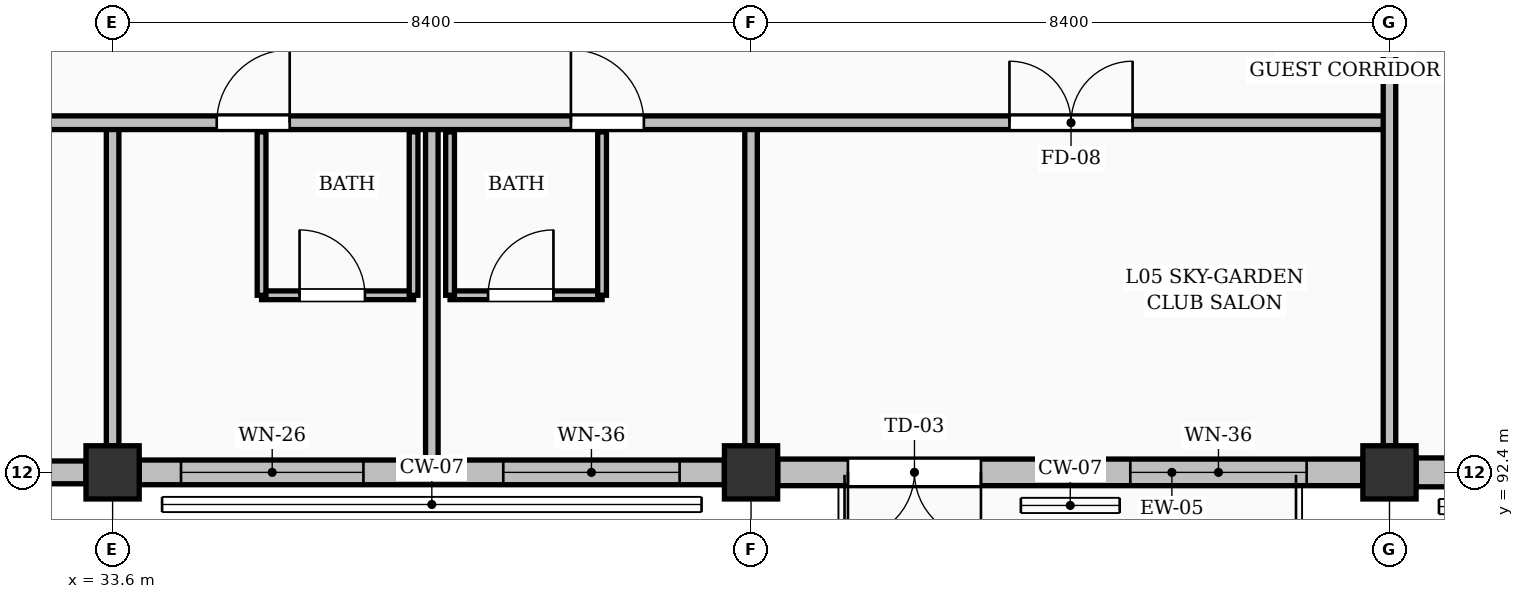
"""IFC4 building model, lengths in metres.
Left out: names, types, materials, properties, quantities, classifications, styles, units other than length and angle.
Written with IfcOpenShell. Run it as: python <this file> out.ifc"""

import sys

from ifc_helpers import new_model, si_unit, direction, frame, frame_2d, origin, origin_2d, place, context, subcontext, project, spatial, rectangle, extrude, element, fill, save


model = new_model("IFC4")
c1 = context("Model", 3, precision=1e-05, world=origin(), true_north=direction((0.0, 1.0)))
c2 = subcontext(c1, "Body", "Model", "MODEL_VIEW")
j1 = project(units=[si_unit("LENGTHUNIT", "METRE"), si_unit("PLANEANGLEUNIT", "RADIAN")], contexts=[c1])
p1 = place(None, origin())
s1 = spatial("IfcSite", under=j1, at=p1, CompositionType="ELEMENT")
p2 = place(p1, origin())
s2 = spatial("IfcBuilding", under=s1, at=p2, CompositionType="ELEMENT")
p3 = place(p2, frame((0.0, 0.0, 18.48)))
s3 = spatial("IfcBuildingStorey", under=s2, at=p3, CompositionType="ELEMENT", Elevation=18.48)
for number, where, z_axis, x_axis in (
    (1, (33.6, 92.4, 0.0), (0.0, 0.0, 1.0), (1.0, 0.0, 0.0)),
    (2, (42.0, 92.4, 0.0), (0.0, 0.0, 1.0), (1.0, 0.0, 0.0)),
    (3, (50.4, 92.4, 0.0), (0.0, 0.0, 1.0), (1.0, 0.0, 0.0)),
):
    element("IfcColumn", number, at=place(p3, frame(where, z_axis=z_axis, x_axis=x_axis)), inside=s3, PredefinedType="COLUMN", context=c2, shape_type="SweptSolid", body=[
        extrude(rectangle(XDim=0.7, YDim=0.7, at=origin_2d()), origin(), (0.0, 0.0, 1.0), 3.36),
    ])
p4 = place(p3, frame((25.551, 92.4, 0.0), z_axis=(0.0, 0.0, 1.0), x_axis=(1.0, 0.0, 0.0)))
e4 = element("IfcWall", 4, at=p4, inside=s3, PredefinedType="SOLIDWALL", context=c2, shape_type="SweptSolid", body=[
    extrude(rectangle(XDim=7.698, YDim=0.3, at=frame_2d((3.849, 0.0))), origin(), (0.0, 0.0, 1.0), 2.494),
])
p5 = place(p4, frame((0.974, 0.0, 0.0)))
e5 = element("IfcOpeningElement", 5, at=p5, cuts=e4, PredefinedType="OPENING", context=c2, shape_type="SweptSolid", body=[
    extrude(rectangle(XDim=1.65, YDim=2.08, at=frame_2d((0.825, 1.04))), frame((0.0, 0.16, 0.0), z_axis=(0.0, -1.0, 0.0), x_axis=(1.0, 0.0, 0.0)), (0.0, 0.0, 1.0), 0.32),
])
p6 = place(p4, frame((4.649, 0.0, 0.25)))
e6 = element("IfcOpeningElement", 6, at=p6, cuts=e4, PredefinedType="OPENING", context=c2, shape_type="SweptSolid", body=[
    extrude(rectangle(XDim=2.3, YDim=1.75, at=frame_2d((1.15, 0.875))), frame((0.0, 0.16, 0.0), z_axis=(0.0, -1.0, 0.0), x_axis=(1.0, 0.0, 0.0)), (0.0, 0.0, 1.0), 0.32),
])
p7 = place(p3, frame((33.951, 92.4, 0.0), z_axis=(0.0, 0.0, 1.0), x_axis=(1.0, 0.0, 0.0)))
e7 = element("IfcWall", 7, at=p7, inside=s3, PredefinedType="SOLIDWALL", context=c2, shape_type="SweptSolid", body=[
    extrude(rectangle(XDim=7.698, YDim=0.325, at=frame_2d((3.849, 0.0))), origin(), (0.0, 0.0, 1.0), 2.494),
])
p8 = place(p7, frame((0.549, 0.0, 0.25)))
e8 = element("IfcOpeningElement", 8, at=p8, cuts=e7, PredefinedType="OPENING", context=c2, shape_type="SweptSolid", body=[
    extrude(rectangle(XDim=2.4, YDim=1.75, at=frame_2d((1.2, 0.875))), frame((0.0, 0.172, 0.0), z_axis=(0.0, -1.0, 0.0), x_axis=(1.0, 0.0, 0.0)), (0.0, 0.0, 1.0), 0.345),
])
p9 = place(p7, frame((4.789, 0.0, 0.25)))
e9 = element("IfcOpeningElement", 9, at=p9, cuts=e7, PredefinedType="OPENING", context=c2, shape_type="SweptSolid", body=[
    extrude(rectangle(XDim=2.32, YDim=1.9, at=frame_2d((1.16, 0.95))), frame((0.0, 0.172, 0.0), z_axis=(0.0, -1.0, 0.0), x_axis=(1.0, 0.0, 0.0)), (0.0, 0.0, 1.0), 0.345),
])
p10 = place(p3, frame((42.351, 92.4, 0.0), z_axis=(0.0, 0.0, 1.0), x_axis=(1.0, 0.0, 0.0)))
e10 = element("IfcWall", 10, at=p10, inside=s3, PredefinedType="SOLIDWALL", context=c2, shape_type="SweptSolid", body=[
    extrude(rectangle(XDim=7.698, YDim=0.35, at=frame_2d((3.849, 0.0))), origin(), (0.0, 0.0, 1.0), 2.494),
])
p11 = place(p10, frame((0.924, 0.0, 0.0)))
e11 = element("IfcOpeningElement", 11, at=p11, cuts=e10, PredefinedType="OPENING", context=c2, shape_type="SweptSolid", body=[
    extrude(rectangle(XDim=1.75, YDim=2.08, at=frame_2d((0.875, 1.04))), frame((0.0, 0.185, 0.0), z_axis=(0.0, -1.0, 0.0), x_axis=(1.0, 0.0, 0.0)), (0.0, 0.0, 1.0), 0.37),
])
p12 = place(p10, frame((4.639, 0.0, 0.25)))
e12 = element("IfcOpeningElement", 12, at=p12, cuts=e10, PredefinedType="OPENING", context=c2, shape_type="SweptSolid", body=[
    extrude(rectangle(XDim=2.32, YDim=1.9, at=frame_2d((1.16, 0.95))), frame((0.0, 0.185, 0.0), z_axis=(0.0, -1.0, 0.0), x_axis=(1.0, 0.0, 0.0)), (0.0, 0.0, 1.0), 0.37),
])
p13 = place(p3, frame((50.751, 92.4, 0.0), z_axis=(0.0, 0.0, 1.0), x_axis=(1.0, 0.0, 0.0)))
e13 = element("IfcWall", 13, at=p13, inside=s3, PredefinedType="SOLIDWALL", context=c2, shape_type="SweptSolid", body=[
    extrude(rectangle(XDim=7.698, YDim=0.38, at=frame_2d((3.849, 0.0))), origin(), (0.0, 0.0, 1.0), 2.494),
])
p14 = place(p13, frame((0.539, 0.0, 0.25)))
e14 = element("IfcOpeningElement", 14, at=p14, cuts=e13, PredefinedType="OPENING", context=c2, shape_type="SweptSolid", body=[
    extrude(rectangle(XDim=2.42, YDim=1.9, at=frame_2d((1.21, 0.95))), frame((0.0, 0.2, 0.0), z_axis=(0.0, -1.0, 0.0), x_axis=(1.0, 0.0, 0.0)), (0.0, 0.0, 1.0), 0.4),
])
p15 = place(p13, frame((4.759, 0.0, 0.25)))
e15 = element("IfcOpeningElement", 15, at=p15, cuts=e13, PredefinedType="OPENING", context=c2, shape_type="SweptSolid", body=[
    extrude(rectangle(XDim=2.38, YDim=2.0, at=frame_2d((1.19, 1.0))), frame((0.0, 0.2, 0.0), z_axis=(0.0, -1.0, 0.0), x_axis=(1.0, 0.0, 0.0)), (0.0, 0.0, 1.0), 0.4),
])
p16 = place(p3, frame((35.56, 94.73, 0.0), z_axis=(0.0, 0.0, 1.0), x_axis=(1.0, 0.0, 0.0)))
e16 = element("IfcWall", 16, at=p16, inside=s3, PredefinedType="PARTITIONING", context=c2, shape_type="SweptSolid", body=[
    extrude(rectangle(XDim=2.0, YDim=0.115, at=frame_2d((1.0, 0.0))), origin(), (0.0, 0.0, 1.0), 3.12),
])
p17 = place(p16, frame((0.5, 0.0, 0.0)))
e17 = element("IfcOpeningElement", 17, at=p17, cuts=e16, PredefinedType="OPENING", context=c2, shape_type="SweptSolid", body=[
    extrude(rectangle(XDim=0.86, YDim=2.05, at=frame_2d((0.43, 1.025))), frame((0.0, 0.067, 0.0), z_axis=(0.0, -1.0, 0.0), x_axis=(1.0, 0.0, 0.0)), (0.0, 0.0, 1.0), 0.135),
])
p18 = place(p3, frame((35.56, 94.73, 0.0), z_axis=(0.0, 0.0, 1.0), x_axis=(0.0, 1.0, 0.0)))
e18 = element("IfcWall", 18, at=p18, inside=s3, PredefinedType="PARTITIONING", context=c2, shape_type="SweptSolid", body=[
    extrude(rectangle(XDim=2.15, YDim=0.115, at=frame_2d((1.075, 0.0))), origin(), (0.0, 0.0, 1.0), 2.642),
])
p19 = place(p3, frame((37.56, 94.73, 0.0), z_axis=(0.0, 0.0, 1.0), x_axis=(0.0, 1.0, 0.0)))
e19 = element("IfcWall", 19, at=p19, inside=s3, PredefinedType="PARTITIONING", context=c2, shape_type="SweptSolid", body=[
    extrude(rectangle(XDim=2.15, YDim=0.115, at=frame_2d((1.075, 0.0))), origin(), (0.0, 0.0, 1.0), 3.12),
])
p20 = place(p3, frame((38.04, 94.73, 0.0), z_axis=(0.0, 0.0, 1.0), x_axis=(1.0, 0.0, 0.0)))
e20 = element("IfcWall", 20, at=p20, inside=s3, PredefinedType="PARTITIONING", context=c2, shape_type="SweptSolid", body=[
    extrude(rectangle(XDim=2.0, YDim=0.115, at=frame_2d((1.0, 0.0))), origin(), (0.0, 0.0, 1.0), 3.12),
])
p21 = place(p20, frame((0.5, 0.0, 0.0)))
e21 = element("IfcOpeningElement", 21, at=p21, cuts=e20, PredefinedType="OPENING", context=c2, shape_type="SweptSolid", body=[
    extrude(rectangle(XDim=0.86, YDim=2.05, at=frame_2d((0.43, 1.025))), frame((0.0, 0.067, 0.0), z_axis=(0.0, -1.0, 0.0), x_axis=(1.0, 0.0, 0.0)), (0.0, 0.0, 1.0), 0.135),
])
p22 = place(p3, frame((38.04, 94.73, 0.0), z_axis=(0.0, 0.0, 1.0), x_axis=(0.0, 1.0, 0.0)))
e22 = element("IfcWall", 22, at=p22, inside=s3, PredefinedType="PARTITIONING", context=c2, shape_type="SweptSolid", body=[
    extrude(rectangle(XDim=2.15, YDim=0.115, at=frame_2d((1.075, 0.0))), origin(), (0.0, 0.0, 1.0), 3.12),
])
p23 = place(p3, frame((40.04, 94.73, 0.0), z_axis=(0.0, 0.0, 1.0), x_axis=(0.0, 1.0, 0.0)))
e23 = element("IfcWall", 23, at=p23, inside=s3, PredefinedType="PARTITIONING", context=c2, shape_type="SweptSolid", body=[
    extrude(rectangle(XDim=2.15, YDim=0.115, at=frame_2d((1.075, 0.0))), origin(), (0.0, 0.0, 1.0), 2.642),
])
p24 = place(p3, frame((37.8, 92.562, 0.0), z_axis=(0.0, 0.0, 1.0), x_axis=(0.0, 1.0, 0.0)))
e24 = element("IfcWall", 24, at=p24, inside=s3, PredefinedType="PARTITIONING", context=c2, shape_type="SweptSolid", body=[
    extrude(rectangle(XDim=4.438, YDim=0.165, at=frame_2d((2.219, 0.0))), origin(), (0.0, 0.0, 1.0), 3.12),
])
for number, where, z_axis, x_axis in (
    (25, (33.6, 92.75, 0.0), (0.0, 0.0, 1.0), (0.0, 1.0, 0.0)),
    (26, (42.0, 92.75, 0.0), (0.0, 0.0, 1.0), (0.0, 1.0, 0.0)),
):
    element("IfcWall", number, at=place(p3, frame(where, z_axis=z_axis, x_axis=x_axis)), inside=s3, PredefinedType="PARTITIONING", context=c2, shape_type="SweptSolid", body=[
        extrude(rectangle(XDim=4.25, YDim=0.165, at=frame_2d((2.125, 0.0))), origin(), (0.0, 0.0, 1.0), 2.455),
    ])
p25 = place(p3, frame((0.225, 97.0, 0.0), z_axis=(0.0, 0.0, 1.0), x_axis=(1.0, 0.0, 0.0)))
e27 = element("IfcWall", 27, at=p25, inside=s3, PredefinedType="PARTITIONING", context=c2, shape_type="SweptSolid", body=[
    extrude(rectangle(XDim=50.175, YDim=0.18, at=frame_2d((25.087, 0.0))), origin(), (0.0, 0.0, 1.0), 3.12),
])
p26 = place(p25, frame((1.145, 0.0, 0.0)))
e28 = element("IfcOpeningElement", 28, at=p26, cuts=e27, PredefinedType="OPENING", context=c2, shape_type="SweptSolid", body=[
    extrude(rectangle(XDim=0.96, YDim=2.15, at=frame_2d((0.48, 1.075))), frame((0.0, 0.1, 0.0), z_axis=(0.0, -1.0, 0.0), x_axis=(1.0, 0.0, 0.0)), (0.0, 0.0, 1.0), 0.2),
])
p27 = place(p25, frame((5.805, 0.0, 0.0)))
e29 = element("IfcOpeningElement", 29, at=p27, cuts=e27, PredefinedType="OPENING", context=c2, shape_type="SweptSolid", body=[
    extrude(rectangle(XDim=0.96, YDim=2.15, at=frame_2d((0.48, 1.075))), frame((0.0, 0.1, 0.0), z_axis=(0.0, -1.0, 0.0), x_axis=(1.0, 0.0, 0.0)), (0.0, 0.0, 1.0), 0.2),
])
p28 = place(p25, frame((9.545, 0.0, 0.0)))
e30 = element("IfcOpeningElement", 30, at=p28, cuts=e27, PredefinedType="OPENING", context=c2, shape_type="SweptSolid", body=[
    extrude(rectangle(XDim=0.96, YDim=2.15, at=frame_2d((0.48, 1.075))), frame((0.0, 0.1, 0.0), z_axis=(0.0, -1.0, 0.0), x_axis=(1.0, 0.0, 0.0)), (0.0, 0.0, 1.0), 0.2),
])
p29 = place(p25, frame((14.205, 0.0, 0.0)))
e31 = element("IfcOpeningElement", 31, at=p29, cuts=e27, PredefinedType="OPENING", context=c2, shape_type="SweptSolid", body=[
    extrude(rectangle(XDim=0.96, YDim=2.15, at=frame_2d((0.48, 1.075))), frame((0.0, 0.1, 0.0), z_axis=(0.0, -1.0, 0.0), x_axis=(1.0, 0.0, 0.0)), (0.0, 0.0, 1.0), 0.2),
])
p30 = place(p25, frame((17.945, 0.0, 0.0)))
e32 = element("IfcOpeningElement", 32, at=p30, cuts=e27, PredefinedType="OPENING", context=c2, shape_type="SweptSolid", body=[
    extrude(rectangle(XDim=0.96, YDim=2.15, at=frame_2d((0.48, 1.075))), frame((0.0, 0.1, 0.0), z_axis=(0.0, -1.0, 0.0), x_axis=(1.0, 0.0, 0.0)), (0.0, 0.0, 1.0), 0.2),
])
p31 = place(p25, frame((22.605, 0.0, 0.0)))
e33 = element("IfcOpeningElement", 33, at=p31, cuts=e27, PredefinedType="OPENING", context=c2, shape_type="SweptSolid", body=[
    extrude(rectangle(XDim=0.96, YDim=2.15, at=frame_2d((0.48, 1.075))), frame((0.0, 0.1, 0.0), z_axis=(0.0, -1.0, 0.0), x_axis=(1.0, 0.0, 0.0)), (0.0, 0.0, 1.0), 0.2),
])
p32 = place(p25, frame((26.345, 0.0, 0.0)))
e34 = element("IfcOpeningElement", 34, at=p32, cuts=e27, PredefinedType="OPENING", context=c2, shape_type="SweptSolid", body=[
    extrude(rectangle(XDim=0.96, YDim=2.15, at=frame_2d((0.48, 1.075))), frame((0.0, 0.1, 0.0), z_axis=(0.0, -1.0, 0.0), x_axis=(1.0, 0.0, 0.0)), (0.0, 0.0, 1.0), 0.2),
])
p33 = place(p25, frame((31.005, 0.0, 0.0)))
e35 = element("IfcOpeningElement", 35, at=p33, cuts=e27, PredefinedType="OPENING", context=c2, shape_type="SweptSolid", body=[
    extrude(rectangle(XDim=0.96, YDim=2.15, at=frame_2d((0.48, 1.075))), frame((0.0, 0.1, 0.0), z_axis=(0.0, -1.0, 0.0), x_axis=(1.0, 0.0, 0.0)), (0.0, 0.0, 1.0), 0.2),
])
p34 = place(p25, frame((34.745, 0.0, 0.0)))
e36 = element("IfcOpeningElement", 36, at=p34, cuts=e27, PredefinedType="OPENING", context=c2, shape_type="SweptSolid", body=[
    extrude(rectangle(XDim=0.96, YDim=2.15, at=frame_2d((0.48, 1.075))), frame((0.0, 0.1, 0.0), z_axis=(0.0, -1.0, 0.0), x_axis=(1.0, 0.0, 0.0)), (0.0, 0.0, 1.0), 0.2),
])
p35 = place(p25, frame((39.405, 0.0, 0.0)))
e37 = element("IfcOpeningElement", 37, at=p35, cuts=e27, PredefinedType="OPENING", context=c2, shape_type="SweptSolid", body=[
    extrude(rectangle(XDim=0.96, YDim=2.15, at=frame_2d((0.48, 1.075))), frame((0.0, 0.1, 0.0), z_axis=(0.0, -1.0, 0.0), x_axis=(1.0, 0.0, 0.0)), (0.0, 0.0, 1.0), 0.2),
])
p36 = place(p25, frame((45.175, 0.0, 0.0)))
e38 = element("IfcOpeningElement", 38, at=p36, cuts=e27, PredefinedType="OPENING", context=c2, shape_type="SweptSolid", body=[
    extrude(rectangle(XDim=1.62, YDim=2.2, at=frame_2d((0.81, 1.1))), frame((0.0, 0.1, 0.0), z_axis=(0.0, -1.0, 0.0), x_axis=(1.0, 0.0, 0.0)), (0.0, 0.0, 1.0), 0.2),
])
p37 = place(p3, frame((50.4, 92.75, 0.0), z_axis=(0.0, 0.0, 1.0), x_axis=(0.0, 1.0, 0.0)))
e39 = element("IfcWall", 39, at=p37, inside=s3, PredefinedType="PARTITIONING", context=c2, shape_type="SweptSolid", body=[
    extrude(rectangle(XDim=12.35, YDim=0.165, at=frame_2d((6.175, 0.0))), origin(), (0.0, 0.0, 1.0), 2.455),
])
p38 = place(p8, origin())
e40 = element("IfcWindow", 40, at=p38, inside=s3, PartitioningType="DOUBLE_PANEL_VERTICAL", PredefinedType="WINDOW", context=c2, shape_type="SweptSolid", body=[
    extrude(rectangle(XDim=2.4, YDim=1.75, at=frame_2d((1.2, 0.875))), frame((0.0, 0.03, 0.0), z_axis=(0.0, -1.0, 0.0), x_axis=(1.0, 0.0, 0.0)), (0.0, 0.0, 1.0), 0.06),
])
fill(e8, e40)
p39 = place(p9, origin())
e41 = element("IfcWindow", 41, at=p39, inside=s3, PartitioningType="DOUBLE_PANEL_VERTICAL", PredefinedType="WINDOW", context=c2, shape_type="SweptSolid", body=[
    extrude(rectangle(XDim=2.32, YDim=1.9, at=frame_2d((1.16, 0.95))), frame((0.0, 0.03, 0.0), z_axis=(0.0, -1.0, 0.0), x_axis=(1.0, 0.0, 0.0)), (0.0, 0.0, 1.0), 0.06),
])
fill(e9, e41)
p40 = place(p11, frame((1.75, 0.0, 0.0), z_axis=(0.0, 0.0, 1.0), x_axis=(-1.0, 0.0, 0.0)))
e42 = element("IfcDoor", 42, at=p40, inside=s3, OperationType="DOUBLE_DOOR_SINGLE_SWING", PredefinedType="DOOR", context=c2, shape_type="SweptSolid", body=[
    extrude(rectangle(XDim=1.75, YDim=2.08, at=frame_2d((0.875, 1.04))), frame((0.0, 0.025, 0.0), z_axis=(0.0, -1.0, 0.0), x_axis=(1.0, 0.0, 0.0)), (0.0, 0.0, 1.0), 0.05),
])
fill(e11, e42)
p41 = place(p12, origin())
e43 = element("IfcWindow", 43, at=p41, inside=s3, PartitioningType="DOUBLE_PANEL_VERTICAL", PredefinedType="WINDOW", context=c2, shape_type="SweptSolid", body=[
    extrude(rectangle(XDim=2.32, YDim=1.9, at=frame_2d((1.16, 0.95))), frame((0.0, 0.03, 0.0), z_axis=(0.0, -1.0, 0.0), x_axis=(1.0, 0.0, 0.0)), (0.0, 0.0, 1.0), 0.06),
])
fill(e12, e43)
p42 = place(p17, origin())
e44 = element("IfcDoor", 44, at=p42, inside=s3, OperationType="SINGLE_SWING_LEFT", PredefinedType="DOOR", context=c2, shape_type="SweptSolid", body=[
    extrude(rectangle(XDim=0.86, YDim=2.05, at=frame_2d((0.43, 1.025))), frame((0.0, 0.025, 0.0), z_axis=(0.0, -1.0, 0.0), x_axis=(1.0, 0.0, 0.0)), (0.0, 0.0, 1.0), 0.05),
])
fill(e17, e44)
p43 = place(p21, origin())
e45 = element("IfcDoor", 45, at=p43, inside=s3, OperationType="SINGLE_SWING_RIGHT", PredefinedType="DOOR", context=c2, shape_type="SweptSolid", body=[
    extrude(rectangle(XDim=0.86, YDim=2.05, at=frame_2d((0.43, 1.025))), frame((0.0, 0.025, 0.0), z_axis=(0.0, -1.0, 0.0), x_axis=(1.0, 0.0, 0.0)), (0.0, 0.0, 1.0), 0.05),
])
fill(e21, e45)
p44 = place(p34, origin())
e46 = element("IfcDoor", 46, at=p44, inside=s3, OperationType="SINGLE_SWING_RIGHT", PredefinedType="DOOR", context=c2, shape_type="SweptSolid", body=[
    extrude(rectangle(XDim=0.96, YDim=2.15, at=frame_2d((0.48, 1.075))), frame((0.0, 0.025, 0.0), z_axis=(0.0, -1.0, 0.0), x_axis=(1.0, 0.0, 0.0)), (0.0, 0.0, 1.0), 0.05),
])
fill(e36, e46)
p45 = place(p35, origin())
e47 = element("IfcDoor", 47, at=p45, inside=s3, OperationType="SINGLE_SWING_LEFT", PredefinedType="DOOR", context=c2, shape_type="SweptSolid", body=[
    extrude(rectangle(XDim=0.96, YDim=2.15, at=frame_2d((0.48, 1.075))), frame((0.0, 0.025, 0.0), z_axis=(0.0, -1.0, 0.0), x_axis=(1.0, 0.0, 0.0)), (0.0, 0.0, 1.0), 0.05),
])
fill(e37, e47)
p46 = place(p36, origin())
e48 = element("IfcDoor", 48, at=p46, inside=s3, OperationType="DOUBLE_DOOR_SINGLE_SWING", PredefinedType="DOOR", context=c2, shape_type="SweptSolid", body=[
    extrude(rectangle(XDim=1.62, YDim=2.2, at=frame_2d((0.81, 1.1))), frame((0.0, 0.025, 0.0), z_axis=(0.0, -1.0, 0.0), x_axis=(1.0, 0.0, 0.0)), (0.0, 0.0, 1.0), 0.05),
])
fill(e38, e48)
save(model, sys.argv[1])
